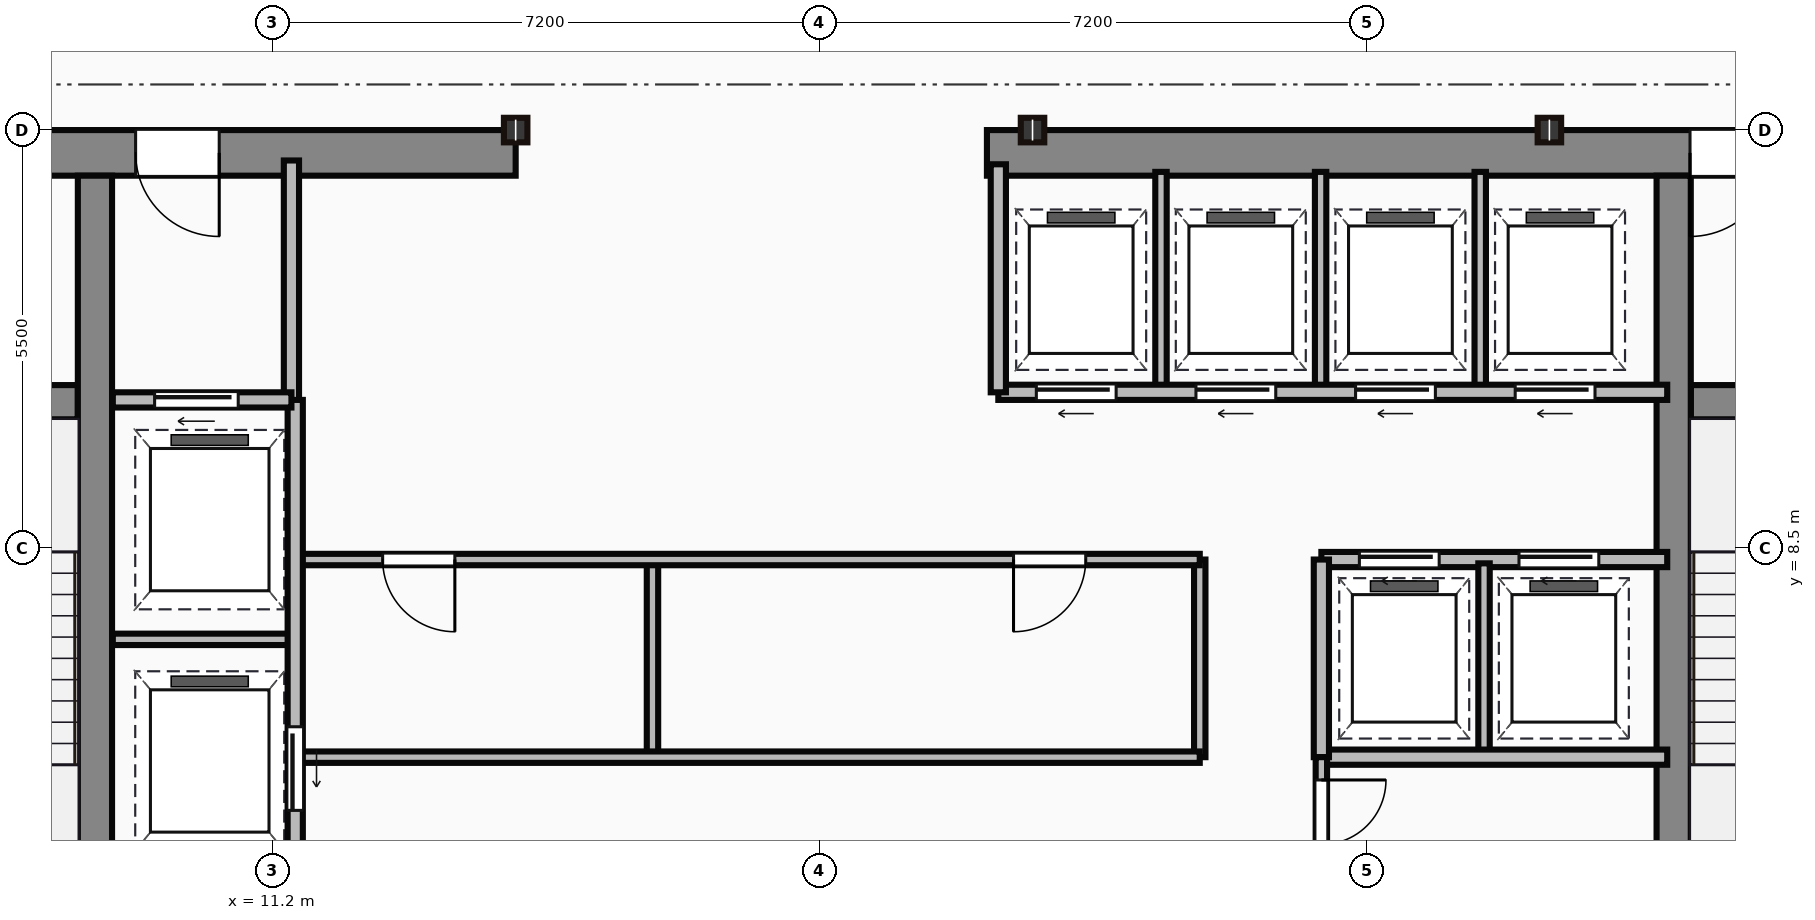
"""IFC4 building model, lengths in metres.
Left out: names, types, materials, properties, quantities, classifications, styles, units other than length and angle.
Written with IfcOpenShell. Run it as: python <this file> out.ifc"""

import sys

from ifc_helpers import new_model, si_unit, direction, frame, frame_2d, origin, origin_2d, place, context, subcontext, project, spatial, rectangle, i_section, extrude, source, transform, mapped, element, fill, save


model = new_model("IFC4")
c1 = context("Model", 3, precision=1e-05, world=origin(), true_north=direction((0.0, 1.0)))
c2 = subcontext(c1, "Body", "Model", "MODEL_VIEW")
j1 = project(units=[si_unit("LENGTHUNIT", "METRE"), si_unit("PLANEANGLEUNIT", "RADIAN")], contexts=[c1])
p1 = place(None, origin())
s1 = spatial("IfcSite", under=j1, at=p1, CompositionType="ELEMENT")
p2 = place(p1, origin())
s2 = spatial("IfcBuilding", under=s1, at=p2, CompositionType="ELEMENT")
p3 = place(p2, frame((0.0, 0.0, 247.85)))
s3 = spatial("IfcBuildingStorey", under=s2, at=p3, CompositionType="ELEMENT", Elevation=247.85)
m1 = source(origin(), c2, "Body", "SweptSolid", [
    extrude(rectangle(XDim=9.1, YDim=0.6, at=frame_2d((4.55, 0.0))), origin(), (0.0, 0.0, 1.0), 3.65),
])
p4 = place(p3, frame((5.3, 13.7, 0.0), z_axis=(0.0, 0.0, 1.0), x_axis=(1.0, 0.0, 0.0)))
e1 = element("IfcWall", 1, at=p4, inside=s3, PredefinedType="SHEAR", context=c2, shape_type="MappedRepresentation", body=[
    mapped(m1, transform((0.0, 0.0, 0.0))),
])
p5 = place(p4, frame((4.1, 0.0, 0.0)))
e2 = element("IfcOpeningElement", 2, at=p5, cuts=e1, PredefinedType="OPENING", context=c2, shape_type="SweptSolid", body=[
    extrude(rectangle(XDim=1.1, YDim=2.15, at=frame_2d((0.55, 1.075))), frame((0.0, 0.31, 0.0), z_axis=(0.0, -1.0, 0.0), x_axis=(1.0, 0.0, 0.0)), (0.0, 0.0, 1.0), 0.62),
])
m2 = source(origin(), c2, "Body", "SweptSolid", [
    extrude(rectangle(XDim=12.6, YDim=0.6, at=frame_2d((6.3, 0.0))), origin(), (0.0, 0.0, 1.0), 3.65),
])
p6 = place(p3, frame((20.6, 13.7, 0.0), z_axis=(0.0, 0.0, 1.0), x_axis=(1.0, 0.0, 0.0)))
e3 = element("IfcWall", 3, at=p6, inside=s3, PredefinedType="SHEAR", context=c2, shape_type="MappedRepresentation", body=[
    mapped(m2, transform((0.0, 0.0, 0.0))),
])
p7 = place(p6, frame((9.25, 0.0, 0.0)))
e4 = element("IfcOpeningElement", 4, at=p7, cuts=e3, PredefinedType="OPENING", context=c2, shape_type="SweptSolid", body=[
    extrude(rectangle(XDim=1.1, YDim=2.15, at=frame_2d((0.55, 1.075))), frame((0.0, 0.31, 0.0), z_axis=(0.0, -1.0, 0.0), x_axis=(1.0, 0.0, 0.0)), (0.0, 0.0, 1.0), 0.62),
])
m3 = source(origin(), c2, "Body", "SweptSolid", [
    extrude(rectangle(XDim=12.5, YDim=0.45, at=frame_2d((6.25, 0.0))), origin(), (0.0, 0.0, 1.0), 3.65),
])
for number, where, z_axis, x_axis in (
    (5, (8.865, 0.9, 0.0), (0.0, 0.0, 1.0), (0.0, 1.0, 0.0)),
    (6, (29.635, 0.9, 0.0), (0.0, 0.0, 1.0), (0.0, 1.0, 0.0)),
):
    element("IfcWall", number, at=place(p3, frame(where, z_axis=z_axis, x_axis=x_axis)), inside=s3, PredefinedType="SHEAR", context=c2, shape_type="MappedRepresentation", body=[
        mapped(m3, transform((0.0, 0.0, 0.0))),
    ])
m4 = source(origin(), c2, "Body", "SweptSolid", [
    extrude(rectangle(XDim=3.39, YDim=0.45, at=frame_2d((1.695, 0.0))), origin(), (0.0, 0.0, 1.0), 3.65),
])
p8 = place(p3, frame((5.25, 10.42, 0.0), z_axis=(0.0, 0.0, 1.0), x_axis=(1.0, 0.0, 0.0)))
e7 = element("IfcWall", 7, at=p8, inside=s3, PredefinedType="SHEAR", context=c2, shape_type="MappedRepresentation", body=[
    mapped(m4, transform((0.0, 0.0, 0.0))),
])
p9 = place(p8, frame((1.05, 0.0, 0.0)))
e8 = element("IfcOpeningElement", 8, at=p9, cuts=e7, PredefinedType="OPENING", context=c2, shape_type="SweptSolid", body=[
    extrude(rectangle(XDim=1.1, YDim=2.15, at=frame_2d((0.55, 1.075))), frame((0.0, 0.235, 0.0), z_axis=(0.0, -1.0, 0.0), x_axis=(1.0, 0.0, 0.0)), (0.0, 0.0, 1.0), 0.47),
])
p10 = place(p3, frame((29.86, 10.42, 0.0), z_axis=(0.0, 0.0, 1.0), x_axis=(1.0, 0.0, 0.0)))
e9 = element("IfcWall", 9, at=p10, inside=s3, PredefinedType="SHEAR", context=c2, shape_type="MappedRepresentation", body=[
    mapped(m4, transform((0.0, 0.0, 0.0))),
])
p11 = place(p10, frame((1.1, 0.0, 0.0)))
e10 = element("IfcOpeningElement", 10, at=p11, cuts=e9, PredefinedType="OPENING", context=c2, shape_type="SweptSolid", body=[
    extrude(rectangle(XDim=1.1, YDim=2.15, at=frame_2d((0.55, 1.075))), frame((0.0, 0.235, 0.0), z_axis=(0.0, -1.0, 0.0), x_axis=(1.0, 0.0, 0.0)), (0.0, 0.0, 1.0), 0.47),
])
m5 = source(origin(), c2, "Body", "SweptSolid", [
    extrude(i_section(OverallWidth=0.309, OverallDepth=0.323, WebThickness=0.014, FlangeThickness=0.023, at=origin_2d()), origin(), (0.0, 0.0, 1.0), 3.65),
])
for number, where, z_axis, x_axis in (
    (11, (14.4, 14.0, 0.0), (0.0, 0.0, 1.0), (1.0, 0.0, 0.0)),
    (12, (21.2, 14.0, 0.0), (0.0, 0.0, 1.0), (1.0, 0.0, 0.0)),
    (13, (28.0, 14.0, 0.0), (0.0, 0.0, 1.0), (1.0, 0.0, 0.0)),
):
    element("IfcColumn", number, at=place(p3, frame(where, z_axis=z_axis, x_axis=x_axis)), inside=s3, PredefinedType="COLUMN", context=c2, shape_type="MappedRepresentation", body=[
        mapped(m5, transform((0.0, 0.0, 0.0))),
    ])
m6 = source(origin(), c2, "Body", "SweptSolid", [
    extrude(rectangle(XDim=3.18, YDim=0.2, at=frame_2d((1.59, 0.0))), origin(), (0.0, 0.0, 1.0), 3.4),
])
p12 = place(p3, frame((11.45, 10.42, 0.0), z_axis=(0.0, 0.0, 1.0), x_axis=(0.0, 1.0, 0.0)))
e14 = element("IfcWall", 14, at=p12, inside=s3, PredefinedType="PARTITIONING", context=c2, shape_type="MappedRepresentation", body=[
    mapped(m6, transform((0.0, 0.0, 0.0))),
])
m7 = source(origin(), c2, "Body", "SweptSolid", [
    extrude(rectangle(XDim=2.35, YDim=0.2, at=frame_2d((1.175, 0.0))), origin(), (0.0, 0.0, 1.0), 3.4),
])
p13 = place(p3, frame((9.1, 10.45, 0.0), z_axis=(0.0, 0.0, 1.0), x_axis=(1.0, 0.0, 0.0)))
e15 = element("IfcWall", 15, at=p13, inside=s3, PredefinedType="PARTITIONING", context=c2, shape_type="MappedRepresentation", body=[
    mapped(m7, transform((0.0, 0.0, 0.0))),
])
p14 = place(p13, frame((0.55, 0.0, 0.0)))
e16 = element("IfcOpeningElement", 16, at=p14, cuts=e15, PredefinedType="OPENING", context=c2, shape_type="SweptSolid", body=[
    extrude(rectangle(XDim=1.1, YDim=2.15, at=frame_2d((0.55, 1.075))), frame((0.0, 0.11, 0.0), z_axis=(0.0, -1.0, 0.0), x_axis=(1.0, 0.0, 0.0)), (0.0, 0.0, 1.0), 0.22),
])
m8 = source(origin(), c2, "Body", "SweptSolid", [
    extrude(rectangle(XDim=9.6, YDim=0.2, at=frame_2d((4.8, 0.0))), origin(), (0.0, 0.0, 1.0), 3.4),
])
p15 = place(p3, frame((11.5, 0.85, 0.0), z_axis=(0.0, 0.0, 1.0), x_axis=(0.0, 1.0, 0.0)))
e17 = element("IfcWall", 17, at=p15, inside=s3, PredefinedType="PARTITIONING", context=c2, shape_type="MappedRepresentation", body=[
    mapped(m8, transform((0.0, 0.0, 0.0))),
])
p16 = place(p15, frame((4.2, 0.0, 0.0)))
e18 = element("IfcOpeningElement", 18, at=p16, cuts=e17, PredefinedType="OPENING", context=c2, shape_type="SweptSolid", body=[
    extrude(rectangle(XDim=1.1, YDim=2.15, at=frame_2d((0.55, 1.075))), frame((0.0, 0.11, 0.0), z_axis=(0.0, -1.0, 0.0), x_axis=(1.0, 0.0, 0.0)), (0.0, 0.0, 1.0), 0.22),
])
p17 = place(p15, frame((0.9, 0.0, 0.0)))
e19 = element("IfcOpeningElement", 19, at=p17, cuts=e17, PredefinedType="OPENING", context=c2, shape_type="SweptSolid", body=[
    extrude(rectangle(XDim=1.2, YDim=2.15, at=frame_2d((0.6, 1.075))), frame((0.0, 0.11, 0.0), z_axis=(0.0, -1.0, 0.0), x_axis=(1.0, 0.0, 0.0)), (0.0, 0.0, 1.0), 0.22),
])
m9 = source(origin(), c2, "Body", "SweptSolid", [
    extrude(rectangle(XDim=2.4, YDim=0.15, at=frame_2d((1.2, 0.0))), origin(), (0.0, 0.0, 1.0), 3.4),
])
p18 = place(p3, frame((9.1, 7.3, 0.0), z_axis=(0.0, 0.0, 1.0), x_axis=(1.0, 0.0, 0.0)))
e20 = element("IfcWall", 20, at=p18, inside=s3, PredefinedType="PARTITIONING", context=c2, shape_type="MappedRepresentation", body=[
    mapped(m9, transform((0.0, 0.0, 0.0))),
])
m10 = source(origin(), c2, "Body", "SweptSolid", [
    extrude(rectangle(XDim=11.85, YDim=0.15, at=frame_2d((5.925, 0.0))), origin(), (0.0, 0.0, 1.0), 3.4),
])
p19 = place(p3, frame((11.55, 5.75, 0.0), z_axis=(0.0, 0.0, 1.0), x_axis=(1.0, 0.0, 0.0)))
e21 = element("IfcWall", 21, at=p19, inside=s3, PredefinedType="PARTITIONING", context=c2, shape_type="MappedRepresentation", body=[
    mapped(m10, transform((0.0, 0.0, 0.0))),
])
p20 = place(p3, frame((11.55, 8.35, 0.0), z_axis=(0.0, 0.0, 1.0), x_axis=(1.0, 0.0, 0.0)))
e22 = element("IfcWall", 22, at=p20, inside=s3, PredefinedType="PARTITIONING", context=c2, shape_type="MappedRepresentation", body=[
    mapped(m10, transform((0.0, 0.0, 0.0))),
])
p21 = place(p20, frame((1.1, 0.0, 0.0)))
e23 = element("IfcOpeningElement", 23, at=p21, cuts=e22, PredefinedType="OPENING", context=c2, shape_type="SweptSolid", body=[
    extrude(rectangle(XDim=0.95, YDim=2.15, at=frame_2d((0.475, 1.075))), frame((0.0, 0.085, 0.0), z_axis=(0.0, -1.0, 0.0), x_axis=(1.0, 0.0, 0.0)), (0.0, 0.0, 1.0), 0.17),
])
p22 = place(p20, frame((9.4, 0.0, 0.0)))
e24 = element("IfcOpeningElement", 24, at=p22, cuts=e22, PredefinedType="OPENING", context=c2, shape_type="SweptSolid", body=[
    extrude(rectangle(XDim=0.95, YDim=2.15, at=frame_2d((0.475, 1.075))), frame((0.0, 0.085, 0.0), z_axis=(0.0, -1.0, 0.0), x_axis=(1.0, 0.0, 0.0)), (0.0, 0.0, 1.0), 0.17),
])
m11 = source(origin(), c2, "Body", "SweptSolid", [
    extrude(rectangle(XDim=2.6, YDim=0.15, at=frame_2d((1.3, 0.0))), origin(), (0.0, 0.0, 1.0), 3.4),
])
p23 = place(p3, frame((23.4, 5.75, 0.0), z_axis=(0.0, 0.0, 1.0), x_axis=(0.0, 1.0, 0.0)))
e25 = element("IfcWall", 25, at=p23, inside=s3, PredefinedType="PARTITIONING", context=c2, shape_type="MappedRepresentation", body=[
    mapped(m11, transform((0.0, 0.0, 0.0))),
])
m12 = source(origin(), c2, "Body", "SweptSolid", [
    extrude(rectangle(XDim=2.5, YDim=0.15, at=frame_2d((1.25, 0.0))), origin(), (0.0, 0.0, 1.0), 3.4),
])
p24 = place(p3, frame((16.2, 5.8, 0.0), z_axis=(0.0, 0.0, 1.0), x_axis=(0.0, 1.0, 0.0)))
e26 = element("IfcWall", 26, at=p24, inside=s3, PredefinedType="PARTITIONING", context=c2, shape_type="MappedRepresentation", body=[
    mapped(m12, transform((0.0, 0.0, 0.0))),
])
m13 = source(origin(), c2, "Body", "SweptSolid", [
    extrude(rectangle(XDim=8.8, YDim=0.2, at=frame_2d((4.4, 0.0))), origin(), (0.0, 0.0, 1.0), 3.4),
])
p25 = place(p3, frame((20.75, 10.55, 0.0), z_axis=(0.0, 0.0, 1.0), x_axis=(1.0, 0.0, 0.0)))
e27 = element("IfcWall", 27, at=p25, inside=s3, PredefinedType="PARTITIONING", context=c2, shape_type="MappedRepresentation", body=[
    mapped(m13, transform((0.0, 0.0, 0.0))),
])
p26 = place(p25, frame((0.5, 0.0, 0.0)))
e28 = element("IfcOpeningElement", 28, at=p26, cuts=e27, PredefinedType="OPENING", context=c2, shape_type="SweptSolid", body=[
    extrude(rectangle(XDim=1.05, YDim=2.15, at=frame_2d((0.525, 1.075))), frame((0.0, 0.11, 0.0), z_axis=(0.0, -1.0, 0.0), x_axis=(1.0, 0.0, 0.0)), (0.0, 0.0, 1.0), 0.22),
])
p27 = place(p25, frame((2.6, 0.0, 0.0)))
e29 = element("IfcOpeningElement", 29, at=p27, cuts=e27, PredefinedType="OPENING", context=c2, shape_type="SweptSolid", body=[
    extrude(rectangle(XDim=1.05, YDim=2.15, at=frame_2d((0.525, 1.075))), frame((0.0, 0.11, 0.0), z_axis=(0.0, -1.0, 0.0), x_axis=(1.0, 0.0, 0.0)), (0.0, 0.0, 1.0), 0.22),
])
p28 = place(p25, frame((4.7, 0.0, 0.0)))
e30 = element("IfcOpeningElement", 30, at=p28, cuts=e27, PredefinedType="OPENING", context=c2, shape_type="SweptSolid", body=[
    extrude(rectangle(XDim=1.05, YDim=2.15, at=frame_2d((0.525, 1.075))), frame((0.0, 0.11, 0.0), z_axis=(0.0, -1.0, 0.0), x_axis=(1.0, 0.0, 0.0)), (0.0, 0.0, 1.0), 0.22),
])
p29 = place(p25, frame((6.8, 0.0, 0.0)))
e31 = element("IfcOpeningElement", 31, at=p29, cuts=e27, PredefinedType="OPENING", context=c2, shape_type="SweptSolid", body=[
    extrude(rectangle(XDim=1.05, YDim=2.15, at=frame_2d((0.525, 1.075))), frame((0.0, 0.11, 0.0), z_axis=(0.0, -1.0, 0.0), x_axis=(1.0, 0.0, 0.0)), (0.0, 0.0, 1.0), 0.22),
])
m14 = source(origin(), c2, "Body", "SweptSolid", [
    extrude(rectangle(XDim=3.0, YDim=0.2, at=frame_2d((1.5, 0.0))), origin(), (0.0, 0.0, 1.0), 3.4),
])
p30 = place(p3, frame((20.75, 10.55, 0.0), z_axis=(0.0, 0.0, 1.0), x_axis=(0.0, 1.0, 0.0)))
e32 = element("IfcWall", 32, at=p30, inside=s3, PredefinedType="PARTITIONING", context=c2, shape_type="MappedRepresentation", body=[
    mapped(m14, transform((0.0, 0.0, 0.0))),
])
m15 = source(origin(), c2, "Body", "SweptSolid", [
    extrude(rectangle(XDim=2.85, YDim=0.15, at=frame_2d((1.425, 0.0))), origin(), (0.0, 0.0, 1.0), 3.4),
])
for number, where, z_axis, x_axis in (
    (33, (22.89, 10.6, 0.0), (0.0, 0.0, 1.0), (0.0, 1.0, 0.0)),
    (34, (24.99, 10.6, 0.0), (0.0, 0.0, 1.0), (0.0, 1.0, 0.0)),
    (35, (27.09, 10.6, 0.0), (0.0, 0.0, 1.0), (0.0, 1.0, 0.0)),
):
    element("IfcWall", number, at=place(p3, frame(where, z_axis=z_axis, x_axis=x_axis)), inside=s3, PredefinedType="PARTITIONING", context=c2, shape_type="MappedRepresentation", body=[
        mapped(m15, transform((0.0, 0.0, 0.0))),
    ])
m16 = source(origin(), c2, "Body", "SweptSolid", [
    extrude(rectangle(XDim=4.55, YDim=0.2, at=frame_2d((2.275, 0.0))), origin(), (0.0, 0.0, 1.0), 3.4),
])
p31 = place(p3, frame((25.0, 8.35, 0.0), z_axis=(0.0, 0.0, 1.0), x_axis=(1.0, 0.0, 0.0)))
e36 = element("IfcWall", 36, at=p31, inside=s3, PredefinedType="PARTITIONING", context=c2, shape_type="MappedRepresentation", body=[
    mapped(m16, transform((0.0, 0.0, 0.0))),
])
p32 = place(p31, frame((0.5, 0.0, 0.0)))
e37 = element("IfcOpeningElement", 37, at=p32, cuts=e36, PredefinedType="OPENING", context=c2, shape_type="SweptSolid", body=[
    extrude(rectangle(XDim=1.05, YDim=2.15, at=frame_2d((0.525, 1.075))), frame((0.0, 0.11, 0.0), z_axis=(0.0, -1.0, 0.0), x_axis=(1.0, 0.0, 0.0)), (0.0, 0.0, 1.0), 0.22),
])
p33 = place(p31, frame((2.6, 0.0, 0.0)))
e38 = element("IfcOpeningElement", 38, at=p33, cuts=e36, PredefinedType="OPENING", context=c2, shape_type="SweptSolid", body=[
    extrude(rectangle(XDim=1.05, YDim=2.15, at=frame_2d((0.525, 1.075))), frame((0.0, 0.11, 0.0), z_axis=(0.0, -1.0, 0.0), x_axis=(1.0, 0.0, 0.0)), (0.0, 0.0, 1.0), 0.22),
])
p34 = place(p3, frame((25.0, 5.75, 0.0), z_axis=(0.0, 0.0, 1.0), x_axis=(1.0, 0.0, 0.0)))
e39 = element("IfcWall", 39, at=p34, inside=s3, PredefinedType="PARTITIONING", context=c2, shape_type="MappedRepresentation", body=[
    mapped(m16, transform((0.0, 0.0, 0.0))),
])
m17 = source(origin(), c2, "Body", "SweptSolid", [
    extrude(rectangle(XDim=2.6, YDim=0.2, at=frame_2d((1.3, 0.0))), origin(), (0.0, 0.0, 1.0), 3.4),
])
p35 = place(p3, frame((25.0, 5.75, 0.0), z_axis=(0.0, 0.0, 1.0), x_axis=(0.0, 1.0, 0.0)))
e40 = element("IfcWall", 40, at=p35, inside=s3, PredefinedType="PARTITIONING", context=c2, shape_type="MappedRepresentation", body=[
    mapped(m17, transform((0.0, 0.0, 0.0))),
])
p36 = place(p3, frame((27.14, 5.8, 0.0), z_axis=(0.0, 0.0, 1.0), x_axis=(0.0, 1.0, 0.0)))
e41 = element("IfcWall", 41, at=p36, inside=s3, PredefinedType="PARTITIONING", context=c2, shape_type="MappedRepresentation", body=[
    mapped(m12, transform((0.0, 0.0, 0.0))),
])
m18 = source(origin(), c2, "Body", "SweptSolid", [
    extrude(rectangle(XDim=4.9, YDim=0.15, at=frame_2d((2.45, 0.0))), origin(), (0.0, 0.0, 1.0), 3.4),
])
p37 = place(p3, frame((25.0, 0.85, 0.0), z_axis=(0.0, 0.0, 1.0), x_axis=(0.0, 1.0, 0.0)))
e42 = element("IfcWall", 42, at=p37, inside=s3, PredefinedType="PARTITIONING", context=c2, shape_type="MappedRepresentation", body=[
    mapped(m18, transform((0.0, 0.0, 0.0))),
])
p38 = place(p37, frame((2.0, 0.0, 0.0)))
e43 = element("IfcOpeningElement", 43, at=p38, cuts=e42, PredefinedType="OPENING", context=c2, shape_type="SweptSolid", body=[
    extrude(rectangle(XDim=0.95, YDim=2.15, at=frame_2d((0.475, 1.075))), frame((0.0, 0.085, 0.0), z_axis=(0.0, -1.0, 0.0), x_axis=(1.0, 0.0, 0.0)), (0.0, 0.0, 1.0), 0.17),
])
p39 = place(p37, frame((3.75, 0.0, 0.0)))
e44 = element("IfcOpeningElement", 44, at=p39, cuts=e42, PredefinedType="OPENING", context=c2, shape_type="SweptSolid", body=[
    extrude(rectangle(XDim=0.85, YDim=2.15, at=frame_2d((0.425, 1.075))), frame((0.0, 0.085, 0.0), z_axis=(0.0, -1.0, 0.0), x_axis=(1.0, 0.0, 0.0)), (0.0, 0.0, 1.0), 0.17),
])
m19 = source(origin(), c2, "Body", "SweptSolid", [
    extrude(rectangle(XDim=1.1, YDim=2.15, at=frame_2d((0.55, 1.075))), frame((0.0, 0.025, 0.0), z_axis=(0.0, -1.0, 0.0), x_axis=(1.0, 0.0, 0.0)), (0.0, 0.0, 1.0), 0.05),
])
p40 = place(p5, origin())
e45 = element("IfcDoor", 45, at=p40, inside=s3, OperationType="SINGLE_SWING_RIGHT", PredefinedType="DOOR", context=c2, shape_type="MappedRepresentation", body=[
    mapped(m19, transform((0.0, 0.0, 0.0))),
])
fill(e2, e45)
p41 = place(p7, origin())
e46 = element("IfcDoor", 46, at=p41, inside=s3, OperationType="SINGLE_SWING_LEFT", PredefinedType="DOOR", context=c2, shape_type="MappedRepresentation", body=[
    mapped(m19, transform((0.0, 0.0, 0.0))),
])
fill(e4, e46)
p42 = place(p14, origin())
e47 = element("IfcDoor", 47, at=p42, inside=s3, OperationType="SLIDING_TO_LEFT", PredefinedType="DOOR", context=c2, shape_type="MappedRepresentation", body=[
    mapped(m19, transform((0.0, 0.0, 0.0))),
])
fill(e16, e47)
p43 = place(p16, frame((1.1, 0.0, 0.0), z_axis=(0.0, 0.0, 1.0), x_axis=(-1.0, 0.0, 0.0)))
e48 = element("IfcDoor", 48, at=p43, inside=s3, OperationType="SLIDING_TO_LEFT", PredefinedType="DOOR", context=c2, shape_type="MappedRepresentation", body=[
    mapped(m19, transform((0.0, 0.0, 0.0))),
])
fill(e18, e48)
m20 = source(origin(), c2, "Body", "SweptSolid", [
    extrude(rectangle(XDim=0.95, YDim=2.15, at=frame_2d((0.475, 1.075))), frame((0.0, 0.025, 0.0), z_axis=(0.0, -1.0, 0.0), x_axis=(1.0, 0.0, 0.0)), (0.0, 0.0, 1.0), 0.05),
])
p44 = place(p21, origin())
e49 = element("IfcDoor", 49, at=p44, inside=s3, OperationType="SINGLE_SWING_RIGHT", PredefinedType="DOOR", context=c2, shape_type="MappedRepresentation", body=[
    mapped(m20, transform((0.0, 0.0, 0.0))),
])
fill(e23, e49)
p45 = place(p22, origin())
e50 = element("IfcDoor", 50, at=p45, inside=s3, OperationType="SINGLE_SWING_LEFT", PredefinedType="DOOR", context=c2, shape_type="MappedRepresentation", body=[
    mapped(m20, transform((0.0, 0.0, 0.0))),
])
fill(e24, e50)
m21 = source(origin(), c2, "Body", "SweptSolid", [
    extrude(rectangle(XDim=1.05, YDim=2.15, at=frame_2d((0.525, 1.075))), frame((0.0, 0.025, 0.0), z_axis=(0.0, -1.0, 0.0), x_axis=(1.0, 0.0, 0.0)), (0.0, 0.0, 1.0), 0.05),
])
p46 = place(p26, frame((1.05, 0.0, 0.0), z_axis=(0.0, 0.0, 1.0), x_axis=(-1.0, 0.0, 0.0)))
e51 = element("IfcDoor", 51, at=p46, inside=s3, OperationType="SLIDING_TO_LEFT", PredefinedType="DOOR", context=c2, shape_type="MappedRepresentation", body=[
    mapped(m21, transform((0.0, 0.0, 0.0))),
])
fill(e28, e51)
p47 = place(p27, frame((1.05, 0.0, 0.0), z_axis=(0.0, 0.0, 1.0), x_axis=(-1.0, 0.0, 0.0)))
e52 = element("IfcDoor", 52, at=p47, inside=s3, OperationType="SLIDING_TO_LEFT", PredefinedType="DOOR", context=c2, shape_type="MappedRepresentation", body=[
    mapped(m21, transform((0.0, 0.0, 0.0))),
])
fill(e29, e52)
p48 = place(p28, frame((1.05, 0.0, 0.0), z_axis=(0.0, 0.0, 1.0), x_axis=(-1.0, 0.0, 0.0)))
e53 = element("IfcDoor", 53, at=p48, inside=s3, OperationType="SLIDING_TO_LEFT", PredefinedType="DOOR", context=c2, shape_type="MappedRepresentation", body=[
    mapped(m21, transform((0.0, 0.0, 0.0))),
])
fill(e30, e53)
p49 = place(p29, frame((1.05, 0.0, 0.0), z_axis=(0.0, 0.0, 1.0), x_axis=(-1.0, 0.0, 0.0)))
e54 = element("IfcDoor", 54, at=p49, inside=s3, OperationType="SLIDING_TO_LEFT", PredefinedType="DOOR", context=c2, shape_type="MappedRepresentation", body=[
    mapped(m21, transform((0.0, 0.0, 0.0))),
])
fill(e31, e54)
p50 = place(p32, origin())
e55 = element("IfcDoor", 55, at=p50, inside=s3, OperationType="SLIDING_TO_LEFT", PredefinedType="DOOR", context=c2, shape_type="MappedRepresentation", body=[
    mapped(m21, transform((0.0, 0.0, 0.0))),
])
fill(e37, e55)
p51 = place(p33, origin())
e56 = element("IfcDoor", 56, at=p51, inside=s3, OperationType="SLIDING_TO_LEFT", PredefinedType="DOOR", context=c2, shape_type="MappedRepresentation", body=[
    mapped(m21, transform((0.0, 0.0, 0.0))),
])
fill(e38, e56)
m22 = source(origin(), c2, "Body", "SweptSolid", [
    extrude(rectangle(XDim=0.85, YDim=2.15, at=frame_2d((0.425, 1.075))), frame((0.0, 0.025, 0.0), z_axis=(0.0, -1.0, 0.0), x_axis=(1.0, 0.0, 0.0)), (0.0, 0.0, 1.0), 0.05),
])
p52 = place(p39, origin())
e57 = element("IfcDoor", 57, at=p52, inside=s3, OperationType="SINGLE_SWING_RIGHT", PredefinedType="DOOR", context=c2, shape_type="MappedRepresentation", body=[
    mapped(m22, transform((0.0, 0.0, 0.0))),
])
fill(e44, e57)
save(model, sys.argv[1])
